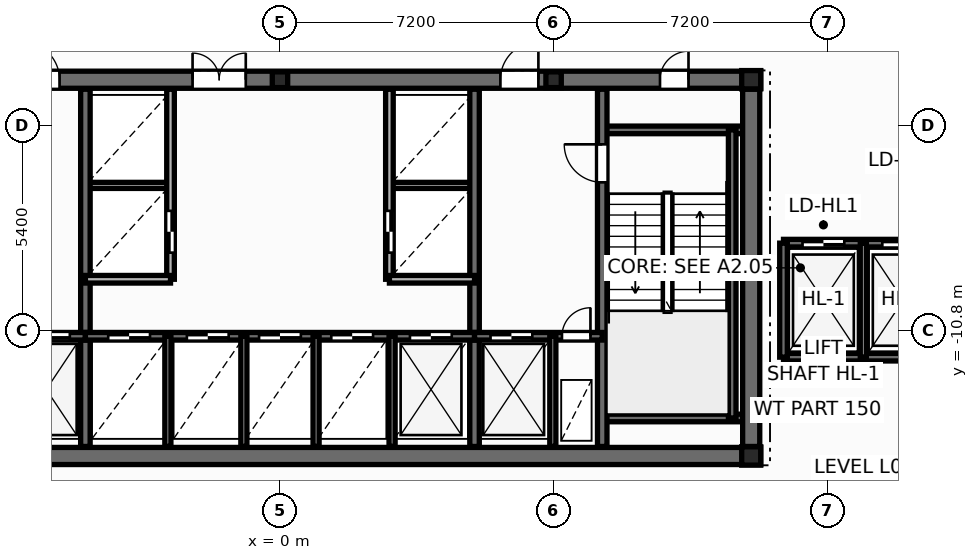
"""IFC4 building model, lengths in metres.
Left out: names, types, materials, properties, quantities, classifications, styles, units other than length and angle.
Written with IfcOpenShell. Run it as: python <this file> out.ifc"""

import sys

from ifc_helpers import new_model, si_unit, direction, frame, frame_2d, origin, origin_2d, place, context, subcontext, project, spatial, rectangle, i_section, extrude, element, fill, save


model = new_model("IFC4")
c1 = context("Model", 3, precision=1e-05, world=origin(), true_north=direction((0.0, 1.0)))
c2 = subcontext(c1, "Body", "Model", "MODEL_VIEW")
j1 = project(units=[si_unit("LENGTHUNIT", "METRE"), si_unit("PLANEANGLEUNIT", "RADIAN")], contexts=[c1])
p1 = place(None, origin())
s1 = spatial("IfcSite", under=j1, at=p1, CompositionType="ELEMENT")
p2 = place(p1, origin())
s2 = spatial("IfcBuilding", under=s1, at=p2, CompositionType="ELEMENT")
p3 = place(p2, frame((0.0, 0.0, 14.4)))
s3 = spatial("IfcBuildingStorey", under=s2, at=p3, CompositionType="ELEMENT", Elevation=14.4)
for number, where, z_axis, x_axis in (
    (1, (12.4, -14.1, 0.0), (0.0, 0.0, 1.0), (1.0, 0.0, 0.0)),
    (2, (12.4, -4.2, 0.0), (0.0, 0.0, 1.0), (1.0, 0.0, 0.0)),
):
    element("IfcColumn", number, at=place(p3, frame(where, z_axis=z_axis, x_axis=x_axis)), inside=s3, PredefinedType="COLUMN", context=c2, shape_type="SweptSolid", body=[
        extrude(i_section(OverallWidth=0.5, OverallDepth=0.482, WebThickness=0.04, FlangeThickness=0.045, at=origin_2d()), origin(), (0.0, 0.0, 1.0), 4.5),
    ])
for number, where, z_axis, x_axis in (
    (3, (0.0, -4.2, 0.0), (0.0, 0.0, 1.0), (1.0, 0.0, 0.0)),
    (4, (7.2, -4.2, 0.0), (0.0, 0.0, 1.0), (1.0, 0.0, 0.0)),
):
    element("IfcColumn", number, at=place(p3, frame(where, z_axis=z_axis, x_axis=x_axis)), inside=s3, PredefinedType="PILASTER", context=c2, shape_type="SweptSolid", body=[
        extrude(i_section(OverallWidth=0.405, OverallDepth=0.414, WebThickness=0.022, FlangeThickness=0.032, at=origin_2d()), origin(), (0.0, 0.0, 1.0), 4.5),
    ])
for number, where, z_axis, x_axis in (
    (5, (-5.12, -6.98, 0.0), (0.0, 0.0, 1.0), (1.0, 0.0, 0.0)),
    (6, (2.88, -6.98, 0.0), (0.0, 0.0, 1.0), (1.0, 0.0, 0.0)),
):
    element("IfcWall", number, at=place(p3, frame(where, z_axis=z_axis, x_axis=x_axis)), inside=s3, PredefinedType="PARTITIONING", context=c2, shape_type="SweptSolid", body=[
        extrude(rectangle(XDim=2.24, YDim=0.16, at=frame_2d((1.12, 0.0))), origin(), (0.0, 0.0, 1.0), 4.1),
    ])
p4 = place(p3, frame((-12.65, -14.1, 0.0), z_axis=(0.0, 0.0, 1.0), x_axis=(1.0, 0.0, 0.0)))
e7 = element("IfcWall", 7, at=p4, inside=s3, PredefinedType="SHEAR", context=c2, shape_type="SweptSolid", body=[
    extrude(rectangle(XDim=25.3, YDim=0.45, at=frame_2d((12.65, 0.0))), origin(), (0.0, 0.0, 1.0), 4.5),
])
p5 = place(p3, frame((-12.65, -4.2, 0.0), z_axis=(0.0, 0.0, 1.0), x_axis=(1.0, 0.0, 0.0)))
e8 = element("IfcWall", 8, at=p5, inside=s3, PredefinedType="SHEAR", context=c2, shape_type="SweptSolid", body=[
    extrude(rectangle(XDim=25.3, YDim=0.45, at=frame_2d((12.65, 0.0))), origin(), (0.0, 0.0, 1.0), 4.5),
])
p6 = place(p5, frame((1.85, 0.0, 0.0)))
e9 = element("IfcOpeningElement", 9, at=p6, cuts=e8, PredefinedType="OPENING", context=c2, shape_type="SweptSolid", body=[
    extrude(rectangle(XDim=0.756, YDim=2.054, at=frame_2d((0.375, 1.027))), frame((0.0, 0.235, 0.0), z_axis=(0.0, -1.0, 0.0), x_axis=(1.0, 0.0, 0.0)), (0.0, 0.0, 1.0), 0.47),
])
p7 = place(p5, frame((22.65, 0.0, 0.0)))
e10 = element("IfcOpeningElement", 10, at=p7, cuts=e8, PredefinedType="OPENING", context=c2, shape_type="SweptSolid", body=[
    extrude(rectangle(XDim=0.756, YDim=2.054, at=frame_2d((0.375, 1.027))), frame((0.0, 0.235, 0.0), z_axis=(0.0, -1.0, 0.0), x_axis=(1.0, 0.0, 0.0)), (0.0, 0.0, 1.0), 0.47),
])
p8 = place(p5, frame((5.85, 0.0, 0.0)))
e11 = element("IfcOpeningElement", 11, at=p8, cuts=e8, PredefinedType="OPENING", context=c2, shape_type="SweptSolid", body=[
    extrude(rectangle(XDim=1.006, YDim=2.104, at=frame_2d((0.5, 1.052))), frame((0.0, 0.235, 0.0), z_axis=(0.0, -1.0, 0.0), x_axis=(1.0, 0.0, 0.0)), (0.0, 0.0, 1.0), 0.47),
])
p9 = place(p5, frame((10.35, 0.0, 0.0)))
e12 = element("IfcOpeningElement", 12, at=p9, cuts=e8, PredefinedType="OPENING", context=c2, shape_type="SweptSolid", body=[
    extrude(rectangle(XDim=1.406, YDim=2.154, at=frame_2d((0.7, 1.077))), frame((0.0, 0.235, 0.0), z_axis=(0.0, -1.0, 0.0), x_axis=(1.0, 0.0, 0.0)), (0.0, 0.0, 1.0), 0.47),
])
p10 = place(p5, frame((18.45, 0.0, 0.0)))
e13 = element("IfcOpeningElement", 13, at=p10, cuts=e8, PredefinedType="OPENING", context=c2, shape_type="SweptSolid", body=[
    extrude(rectangle(XDim=1.006, YDim=2.104, at=frame_2d((0.5, 1.052))), frame((0.0, 0.235, 0.0), z_axis=(0.0, -1.0, 0.0), x_axis=(1.0, 0.0, 0.0)), (0.0, 0.0, 1.0), 0.47),
])
for number, where, z_axis, x_axis in (
    (14, (8.48, -5.52, 0.0), (0.0, 0.0, 1.0), (1.0, 0.0, 0.0)),
    (15, (8.48, -13.1, 0.0), (0.0, 0.0, 1.0), (1.0, 0.0, 0.0)),
):
    element("IfcWall", number, at=place(p3, frame(where, z_axis=z_axis, x_axis=x_axis)), inside=s3, PredefinedType="SOLIDWALL", context=c2, shape_type="SweptSolid", body=[
        extrude(rectangle(XDim=3.87, YDim=0.2, at=frame_2d((1.935, 0.0))), origin(), (0.0, 0.0, 1.0), 4.5),
    ])
p11 = place(p3, frame((11.9, -13.1, 0.0), z_axis=(0.0, 0.0, 1.0), x_axis=(0.0, 1.0, 0.0)))
e16 = element("IfcWall", 16, at=p11, inside=s3, PredefinedType="SOLIDWALL", context=c2, shape_type="SweptSolid", body=[
    extrude(rectangle(XDim=7.58, YDim=0.2, at=frame_2d((3.79, 0.0))), origin(), (0.0, 0.0, 1.0), 4.5),
])
p12 = place(p3, frame((8.48, -13.85, 0.0), z_axis=(0.0, 0.0, 1.0), x_axis=(0.0, 1.0, 0.0)))
e17 = element("IfcWall", 17, at=p12, inside=s3, PredefinedType="SHEAR", context=c2, shape_type="SweptSolid", body=[
    extrude(rectangle(XDim=9.4, YDim=0.25, at=frame_2d((4.7, 0.0))), origin(), (0.0, 0.0, 1.0), 4.5),
])
p13 = place(p12, frame((6.95, 0.0, 0.0)))
e18 = element("IfcOpeningElement", 18, at=p13, cuts=e17, PredefinedType="OPENING", context=c2, shape_type="SweptSolid", body=[
    extrude(rectangle(XDim=1.006, YDim=2.104, at=frame_2d((0.5, 1.052))), frame((0.0, 0.135, 0.0), z_axis=(0.0, -1.0, 0.0), x_axis=(1.0, 0.0, 0.0)), (0.0, 0.0, 1.0), 0.27),
])
for number, where, z_axis, x_axis in (
    (19, (-5.12, -13.85, 0.0), (0.0, 0.0, 1.0), (0.0, 1.0, 0.0)),
    (20, (5.12, -13.85, 0.0), (0.0, 0.0, 1.0), (0.0, 1.0, 0.0)),
):
    element("IfcWall", number, at=place(p3, frame(where, z_axis=z_axis, x_axis=x_axis)), inside=s3, PredefinedType="SHEAR", context=c2, shape_type="SweptSolid", body=[
        extrude(rectangle(XDim=9.4, YDim=0.25, at=frame_2d((4.7, 0.0))), origin(), (0.0, 0.0, 1.0), 4.5),
    ])
p14 = place(p3, frame((-8.48, -10.95, 0.0), z_axis=(0.0, 0.0, 1.0), x_axis=(1.0, 0.0, 0.0)))
e21 = element("IfcWall", 21, at=p14, inside=s3, PredefinedType="SOLIDWALL", context=c2, shape_type="SweptSolid", body=[
    extrude(rectangle(XDim=3.36, YDim=0.2, at=frame_2d((1.68, 0.0))), origin(), (0.0, 0.0, 1.0), 4.5),
])
p15 = place(p14, frame((0.28, 0.0, 0.0)))
e22 = element("IfcOpeningElement", 22, at=p15, cuts=e21, PredefinedType="OPENING", context=c2, shape_type="SweptSolid", body=[
    extrude(rectangle(XDim=0.756, YDim=2.054, at=frame_2d((0.375, 1.027))), frame((0.0, 0.11, 0.0), z_axis=(0.0, -1.0, 0.0), x_axis=(1.0, 0.0, 0.0)), (0.0, 0.0, 1.0), 0.22),
])
p16 = place(p14, frame((1.85, 0.0, 0.0)))
e23 = element("IfcOpeningElement", 23, at=p16, cuts=e21, PredefinedType="OPENING", context=c2, shape_type="SweptSolid", body=[
    extrude(rectangle(XDim=1.106, YDim=2.104, at=frame_2d((0.55, 1.052))), frame((0.0, 0.11, 0.0), z_axis=(0.0, -1.0, 0.0), x_axis=(1.0, 0.0, 0.0)), (0.0, 0.0, 1.0), 0.22),
])
p17 = place(p3, frame((-5.12, -10.95, 0.0), z_axis=(0.0, 0.0, 1.0), x_axis=(1.0, 0.0, 0.0)))
e24 = element("IfcWall", 24, at=p17, inside=s3, PredefinedType="SOLIDWALL", context=c2, shape_type="SweptSolid", body=[
    extrude(rectangle(XDim=10.24, YDim=0.2, at=frame_2d((5.12, 0.0))), origin(), (0.0, 0.0, 1.0), 4.5),
])
p18 = place(p17, frame((0.6, 0.0, 0.0)))
e25 = element("IfcOpeningElement", 25, at=p18, cuts=e24, PredefinedType="OPENING", context=c2, shape_type="SweptSolid", body=[
    extrude(rectangle(XDim=1.106, YDim=2.104, at=frame_2d((0.55, 1.052))), frame((0.0, 0.11, 0.0), z_axis=(0.0, -1.0, 0.0), x_axis=(1.0, 0.0, 0.0)), (0.0, 0.0, 1.0), 0.22),
])
p19 = place(p17, frame((2.67, 0.0, 0.0)))
e26 = element("IfcOpeningElement", 26, at=p19, cuts=e24, PredefinedType="OPENING", context=c2, shape_type="SweptSolid", body=[
    extrude(rectangle(XDim=1.106, YDim=2.104, at=frame_2d((0.55, 1.052))), frame((0.0, 0.11, 0.0), z_axis=(0.0, -1.0, 0.0), x_axis=(1.0, 0.0, 0.0)), (0.0, 0.0, 1.0), 0.22),
])
p20 = place(p17, frame((4.57, 0.0, 0.0)))
e27 = element("IfcOpeningElement", 27, at=p20, cuts=e24, PredefinedType="OPENING", context=c2, shape_type="SweptSolid", body=[
    extrude(rectangle(XDim=1.106, YDim=2.104, at=frame_2d((0.55, 1.052))), frame((0.0, 0.11, 0.0), z_axis=(0.0, -1.0, 0.0), x_axis=(1.0, 0.0, 0.0)), (0.0, 0.0, 1.0), 0.22),
])
p21 = place(p17, frame((6.47, 0.0, 0.0)))
e28 = element("IfcOpeningElement", 28, at=p21, cuts=e24, PredefinedType="OPENING", context=c2, shape_type="SweptSolid", body=[
    extrude(rectangle(XDim=1.106, YDim=2.104, at=frame_2d((0.55, 1.052))), frame((0.0, 0.11, 0.0), z_axis=(0.0, -1.0, 0.0), x_axis=(1.0, 0.0, 0.0)), (0.0, 0.0, 1.0), 0.22),
])
p22 = place(p17, frame((8.54, 0.0, 0.0)))
e29 = element("IfcOpeningElement", 29, at=p22, cuts=e24, PredefinedType="OPENING", context=c2, shape_type="SweptSolid", body=[
    extrude(rectangle(XDim=1.106, YDim=2.104, at=frame_2d((0.55, 1.052))), frame((0.0, 0.11, 0.0), z_axis=(0.0, -1.0, 0.0), x_axis=(1.0, 0.0, 0.0)), (0.0, 0.0, 1.0), 0.22),
])
p23 = place(p3, frame((5.12, -10.95, 0.0), z_axis=(0.0, 0.0, 1.0), x_axis=(1.0, 0.0, 0.0)))
e30 = element("IfcWall", 30, at=p23, inside=s3, PredefinedType="SOLIDWALL", context=c2, shape_type="SweptSolid", body=[
    extrude(rectangle(XDim=3.36, YDim=0.2, at=frame_2d((1.68, 0.0))), origin(), (0.0, 0.0, 1.0), 4.5),
])
p24 = place(p23, frame((0.42, 0.0, 0.0)))
e31 = element("IfcOpeningElement", 31, at=p24, cuts=e30, PredefinedType="OPENING", context=c2, shape_type="SweptSolid", body=[
    extrude(rectangle(XDim=1.106, YDim=2.104, at=frame_2d((0.55, 1.052))), frame((0.0, 0.11, 0.0), z_axis=(0.0, -1.0, 0.0), x_axis=(1.0, 0.0, 0.0)), (0.0, 0.0, 1.0), 0.22),
])
p25 = place(p23, frame((2.3, 0.0, 0.0)))
e32 = element("IfcOpeningElement", 32, at=p25, cuts=e30, PredefinedType="OPENING", context=c2, shape_type="SweptSolid", body=[
    extrude(rectangle(XDim=0.756, YDim=2.054, at=frame_2d((0.375, 1.027))), frame((0.0, 0.11, 0.0), z_axis=(0.0, -1.0, 0.0), x_axis=(1.0, 0.0, 0.0)), (0.0, 0.0, 1.0), 0.22),
])
for number, where, z_axis, x_axis in (
    (33, (7.18, -13.85, 0.0), (0.0, 0.0, 1.0), (0.0, 1.0, 0.0)),
    (34, (-2.95, -13.85, 0.0), (0.0, 0.0, 1.0), (0.0, 1.0, 0.0)),
    (35, (2.95, -13.85, 0.0), (0.0, 0.0, 1.0), (0.0, 1.0, 0.0)),
):
    element("IfcWall", number, at=place(p3, frame(where, z_axis=z_axis, x_axis=x_axis)), inside=s3, PredefinedType="PARTITIONING", context=c2, shape_type="SweptSolid", body=[
        extrude(rectangle(XDim=2.9, YDim=0.16, at=frame_2d((1.45, 0.0))), origin(), (0.0, 0.0, 1.0), 3.125),
    ])
p26 = place(p3, frame((12.4, -13.85, 0.0), z_axis=(0.0, 0.0, 1.0), x_axis=(0.0, 1.0, 0.0)))
e36 = element("IfcWall", 36, at=p26, inside=s3, PredefinedType="SHEAR", context=c2, shape_type="SweptSolid", body=[
    extrude(rectangle(XDim=9.4, YDim=0.45, at=frame_2d((4.7, 0.0))), origin(), (0.0, 0.0, 1.0), 4.5),
])
p27 = place(p3, frame((-2.88, -9.45, 0.0), z_axis=(0.0, 0.0, 1.0), x_axis=(0.0, 1.0, 0.0)))
e37 = element("IfcWall", 37, at=p27, inside=s3, PredefinedType="SOLIDWALL", context=c2, shape_type="SweptSolid", body=[
    extrude(rectangle(XDim=5.0, YDim=0.2, at=frame_2d((2.5, 0.0))), origin(), (0.0, 0.0, 1.0), 4.1),
])
p28 = place(p27, frame((0.7, 0.0, 0.0)))
e38 = element("IfcOpeningElement", 38, at=p28, cuts=e37, PredefinedType="OPENING", context=c2, shape_type="SweptSolid", body=[
    extrude(rectangle(XDim=1.106, YDim=2.104, at=frame_2d((0.55, 1.052))), frame((0.0, 0.11, 0.0), z_axis=(0.0, -1.0, 0.0), x_axis=(1.0, 0.0, 0.0)), (0.0, 0.0, 1.0), 0.22),
])
p29 = place(p3, frame((-5.12, -9.45, 0.0), z_axis=(0.0, 0.0, 1.0), x_axis=(1.0, 0.0, 0.0)))
e39 = element("IfcWall", 39, at=p29, inside=s3, PredefinedType="SOLIDWALL", context=c2, shape_type="SweptSolid", body=[
    extrude(rectangle(XDim=2.24, YDim=0.2, at=frame_2d((1.12, 0.0))), origin(), (0.0, 0.0, 1.0), 4.1),
])
p30 = place(p3, frame((2.88, -9.45, 0.0), z_axis=(0.0, 0.0, 1.0), x_axis=(0.0, 1.0, 0.0)))
e40 = element("IfcWall", 40, at=p30, inside=s3, PredefinedType="SOLIDWALL", context=c2, shape_type="SweptSolid", body=[
    extrude(rectangle(XDim=5.0, YDim=0.2, at=frame_2d((2.5, 0.0))), origin(), (0.0, 0.0, 1.0), 4.1),
])
p31 = place(p30, frame((0.7, 0.0, 0.0)))
e41 = element("IfcOpeningElement", 41, at=p31, cuts=e40, PredefinedType="OPENING", context=c2, shape_type="SweptSolid", body=[
    extrude(rectangle(XDim=1.106, YDim=2.104, at=frame_2d((0.55, 1.052))), frame((0.0, 0.11, 0.0), z_axis=(0.0, -1.0, 0.0), x_axis=(1.0, 0.0, 0.0)), (0.0, 0.0, 1.0), 0.22),
])
p32 = place(p3, frame((2.88, -9.45, 0.0), z_axis=(0.0, 0.0, 1.0), x_axis=(1.0, 0.0, 0.0)))
e42 = element("IfcWall", 42, at=p32, inside=s3, PredefinedType="SOLIDWALL", context=c2, shape_type="SweptSolid", body=[
    extrude(rectangle(XDim=2.24, YDim=0.2, at=frame_2d((1.12, 0.0))), origin(), (0.0, 0.0, 1.0), 4.1),
])
for number, where, z_axis, x_axis in (
    (43, (-0.95, -13.85, 0.0), (0.0, 0.0, 1.0), (0.0, 1.0, 0.0)),
    (44, (0.95, -13.85, 0.0), (0.0, 0.0, 1.0), (0.0, 1.0, 0.0)),
):
    element("IfcWall", number, at=place(p3, frame(where, z_axis=z_axis, x_axis=x_axis)), inside=s3, PredefinedType="PARTITIONING", context=c2, shape_type="SweptSolid", body=[
        extrude(rectangle(XDim=2.9, YDim=0.16, at=frame_2d((1.45, 0.0))), origin(), (0.0, 0.0, 1.0), 3.125),
    ])
p33 = place(p3, frame((13.25, -11.5, 0.0), z_axis=(0.0, 0.0, 1.0), x_axis=(1.0, 0.0, 0.0)))
e45 = element("IfcWall", 45, at=p33, inside=s3, PredefinedType="SOLIDWALL", context=c2, shape_type="SweptSolid", body=[
    extrude(rectangle(XDim=4.2, YDim=0.2, at=frame_2d((2.1, 0.0))), origin(), (0.0, 0.0, 1.0), 4.5),
])
p34 = place(p3, frame((13.25, -8.5, 0.0), z_axis=(0.0, 0.0, 1.0), x_axis=(1.0, 0.0, 0.0)))
e46 = element("IfcWall", 46, at=p34, inside=s3, PredefinedType="SOLIDWALL", context=c2, shape_type="SweptSolid", body=[
    extrude(rectangle(XDim=4.2, YDim=0.2, at=frame_2d((2.1, 0.0))), origin(), (0.0, 0.0, 1.0), 4.5),
])
p35 = place(p34, frame((0.5, 0.0, 0.0)))
e47 = element("IfcOpeningElement", 47, at=p35, cuts=e46, PredefinedType="OPENING", context=c2, shape_type="SweptSolid", body=[
    extrude(rectangle(XDim=1.106, YDim=2.104, at=frame_2d((0.55, 1.052))), frame((0.0, 0.11, 0.0), z_axis=(0.0, -1.0, 0.0), x_axis=(1.0, 0.0, 0.0)), (0.0, 0.0, 1.0), 0.22),
])
p36 = place(p34, frame((2.6, 0.0, 0.0)))
e48 = element("IfcOpeningElement", 48, at=p36, cuts=e46, PredefinedType="OPENING", context=c2, shape_type="SweptSolid", body=[
    extrude(rectangle(XDim=1.106, YDim=2.104, at=frame_2d((0.55, 1.052))), frame((0.0, 0.11, 0.0), z_axis=(0.0, -1.0, 0.0), x_axis=(1.0, 0.0, 0.0)), (0.0, 0.0, 1.0), 0.22),
])
p37 = place(p3, frame((13.25, -11.5, 0.0), z_axis=(0.0, 0.0, 1.0), x_axis=(0.0, 1.0, 0.0)))
e49 = element("IfcWall", 49, at=p37, inside=s3, PredefinedType="SOLIDWALL", context=c2, shape_type="SweptSolid", body=[
    extrude(rectangle(XDim=3.0, YDim=0.2, at=frame_2d((1.5, 0.0))), origin(), (0.0, 0.0, 1.0), 4.5),
])
p38 = place(p3, frame((15.35, -11.5, 0.0), z_axis=(0.0, 0.0, 1.0), x_axis=(0.0, 1.0, 0.0)))
e50 = element("IfcWall", 50, at=p38, inside=s3, PredefinedType="PARTITIONING", context=c2, shape_type="SweptSolid", body=[
    extrude(rectangle(XDim=3.0, YDim=0.16, at=frame_2d((1.5, 0.0))), origin(), (0.0, 0.0, 1.0), 4.1),
])
p39 = place(p28, origin())
e51 = element("IfcDoor", 51, at=p39, inside=s3, OperationType="DOUBLE_DOOR_SLIDING", PredefinedType="DOOR", context=c2, shape_type="SweptSolid", body=[
    extrude(rectangle(XDim=1.1, YDim=2.1, at=frame_2d((0.55, 1.05))), frame((0.0, 0.025, 0.0), z_axis=(0.0, -1.0, 0.0), x_axis=(1.0, 0.0, 0.0)), (0.0, 0.0, 1.0), 0.05),
])
fill(e38, e51)
p40 = place(p31, origin())
e52 = element("IfcDoor", 52, at=p40, inside=s3, OperationType="DOUBLE_DOOR_SLIDING", PredefinedType="DOOR", context=c2, shape_type="SweptSolid", body=[
    extrude(rectangle(XDim=1.1, YDim=2.1, at=frame_2d((0.55, 1.05))), frame((0.0, 0.025, 0.0), z_axis=(0.0, -1.0, 0.0), x_axis=(1.0, 0.0, 0.0)), (0.0, 0.0, 1.0), 0.05),
])
fill(e41, e52)
p41 = place(p13, origin())
e53 = element("IfcDoor", 53, at=p41, inside=s3, OperationType="SINGLE_SWING_RIGHT", PredefinedType="DOOR", context=c2, shape_type="SweptSolid", body=[
    extrude(rectangle(XDim=1.0, YDim=2.1, at=frame_2d((0.5, 1.05))), frame((0.0, 0.025, 0.0), z_axis=(0.0, -1.0, 0.0), x_axis=(1.0, 0.0, 0.0)), (0.0, 0.0, 1.0), 0.05),
])
fill(e18, e53)
p42 = place(p16, origin())
e54 = element("IfcDoor", 54, at=p42, inside=s3, OperationType="DOUBLE_DOOR_SLIDING", PredefinedType="DOOR", context=c2, shape_type="SweptSolid", body=[
    extrude(rectangle(XDim=1.1, YDim=2.1, at=frame_2d((0.55, 1.05))), frame((0.0, 0.025, 0.0), z_axis=(0.0, -1.0, 0.0), x_axis=(1.0, 0.0, 0.0)), (0.0, 0.0, 1.0), 0.05),
])
fill(e23, e54)
p43 = place(p24, origin())
e55 = element("IfcDoor", 55, at=p43, inside=s3, OperationType="DOUBLE_DOOR_SLIDING", PredefinedType="DOOR", context=c2, shape_type="SweptSolid", body=[
    extrude(rectangle(XDim=1.1, YDim=2.1, at=frame_2d((0.55, 1.05))), frame((0.0, 0.025, 0.0), z_axis=(0.0, -1.0, 0.0), x_axis=(1.0, 0.0, 0.0)), (0.0, 0.0, 1.0), 0.05),
])
fill(e31, e55)
p44 = place(p25, origin())
e56 = element("IfcDoor", 56, at=p44, inside=s3, OperationType="SINGLE_SWING_RIGHT", PredefinedType="DOOR", context=c2, shape_type="SweptSolid", body=[
    extrude(rectangle(XDim=0.75, YDim=2.05, at=frame_2d((0.375, 1.025))), frame((0.0, 0.025, 0.0), z_axis=(0.0, -1.0, 0.0), x_axis=(1.0, 0.0, 0.0)), (0.0, 0.0, 1.0), 0.05),
])
fill(e32, e56)
p45 = place(p18, origin())
e57 = element("IfcDoor", 57, at=p45, inside=s3, OperationType="DOUBLE_DOOR_SLIDING", PredefinedType="DOOR", context=c2, shape_type="SweptSolid", body=[
    extrude(rectangle(XDim=1.1, YDim=2.1, at=frame_2d((0.55, 1.05))), frame((0.0, 0.025, 0.0), z_axis=(0.0, -1.0, 0.0), x_axis=(1.0, 0.0, 0.0)), (0.0, 0.0, 1.0), 0.05),
])
fill(e25, e57)
p46 = place(p19, origin())
e58 = element("IfcDoor", 58, at=p46, inside=s3, OperationType="DOUBLE_DOOR_SLIDING", PredefinedType="DOOR", context=c2, shape_type="SweptSolid", body=[
    extrude(rectangle(XDim=1.1, YDim=2.1, at=frame_2d((0.55, 1.05))), frame((0.0, 0.025, 0.0), z_axis=(0.0, -1.0, 0.0), x_axis=(1.0, 0.0, 0.0)), (0.0, 0.0, 1.0), 0.05),
])
fill(e26, e58)
p47 = place(p20, origin())
e59 = element("IfcDoor", 59, at=p47, inside=s3, OperationType="DOUBLE_DOOR_SLIDING", PredefinedType="DOOR", context=c2, shape_type="SweptSolid", body=[
    extrude(rectangle(XDim=1.1, YDim=2.1, at=frame_2d((0.55, 1.05))), frame((0.0, 0.025, 0.0), z_axis=(0.0, -1.0, 0.0), x_axis=(1.0, 0.0, 0.0)), (0.0, 0.0, 1.0), 0.05),
])
fill(e27, e59)
p48 = place(p21, origin())
e60 = element("IfcDoor", 60, at=p48, inside=s3, OperationType="DOUBLE_DOOR_SLIDING", PredefinedType="DOOR", context=c2, shape_type="SweptSolid", body=[
    extrude(rectangle(XDim=1.1, YDim=2.1, at=frame_2d((0.55, 1.05))), frame((0.0, 0.025, 0.0), z_axis=(0.0, -1.0, 0.0), x_axis=(1.0, 0.0, 0.0)), (0.0, 0.0, 1.0), 0.05),
])
fill(e28, e60)
p49 = place(p22, origin())
e61 = element("IfcDoor", 61, at=p49, inside=s3, OperationType="DOUBLE_DOOR_SLIDING", PredefinedType="DOOR", context=c2, shape_type="SweptSolid", body=[
    extrude(rectangle(XDim=1.1, YDim=2.1, at=frame_2d((0.55, 1.05))), frame((0.0, 0.025, 0.0), z_axis=(0.0, -1.0, 0.0), x_axis=(1.0, 0.0, 0.0)), (0.0, 0.0, 1.0), 0.05),
])
fill(e29, e61)
p50 = place(p7, origin())
e62 = element("IfcDoor", 62, at=p50, inside=s3, OperationType="SINGLE_SWING_RIGHT", PredefinedType="DOOR", context=c2, shape_type="SweptSolid", body=[
    extrude(rectangle(XDim=0.75, YDim=2.05, at=frame_2d((0.375, 1.025))), frame((0.0, 0.025, 0.0), z_axis=(0.0, -1.0, 0.0), x_axis=(1.0, 0.0, 0.0)), (0.0, 0.0, 1.0), 0.05),
])
fill(e10, e62)
p51 = place(p8, origin())
e63 = element("IfcDoor", 63, at=p51, inside=s3, OperationType="SINGLE_SWING_LEFT", PredefinedType="DOOR", context=c2, shape_type="SweptSolid", body=[
    extrude(rectangle(XDim=1.0, YDim=2.1, at=frame_2d((0.5, 1.05))), frame((0.0, 0.025, 0.0), z_axis=(0.0, -1.0, 0.0), x_axis=(1.0, 0.0, 0.0)), (0.0, 0.0, 1.0), 0.05),
])
fill(e11, e63)
p52 = place(p9, origin())
e64 = element("IfcDoor", 64, at=p52, inside=s3, OperationType="DOUBLE_DOOR_SINGLE_SWING", PredefinedType="DOOR", context=c2, shape_type="SweptSolid", body=[
    extrude(rectangle(XDim=1.4, YDim=2.15, at=frame_2d((0.7, 1.075))), frame((0.0, 0.025, 0.0), z_axis=(0.0, -1.0, 0.0), x_axis=(1.0, 0.0, 0.0)), (0.0, 0.0, 1.0), 0.05),
])
fill(e12, e64)
p53 = place(p10, origin())
e65 = element("IfcDoor", 65, at=p53, inside=s3, OperationType="SINGLE_SWING_RIGHT", PredefinedType="DOOR", context=c2, shape_type="SweptSolid", body=[
    extrude(rectangle(XDim=1.0, YDim=2.1, at=frame_2d((0.5, 1.05))), frame((0.0, 0.025, 0.0), z_axis=(0.0, -1.0, 0.0), x_axis=(1.0, 0.0, 0.0)), (0.0, 0.0, 1.0), 0.05),
])
fill(e13, e65)
p54 = place(p35, origin())
e66 = element("IfcDoor", 66, at=p54, inside=s3, OperationType="DOUBLE_DOOR_SLIDING", PredefinedType="DOOR", context=c2, shape_type="SweptSolid", body=[
    extrude(rectangle(XDim=1.1, YDim=2.1, at=frame_2d((0.55, 1.05))), frame((0.0, 0.025, 0.0), z_axis=(0.0, -1.0, 0.0), x_axis=(1.0, 0.0, 0.0)), (0.0, 0.0, 1.0), 0.05),
])
fill(e47, e66)
p55 = place(p36, origin())
e67 = element("IfcDoor", 67, at=p55, inside=s3, OperationType="DOUBLE_DOOR_SLIDING", PredefinedType="DOOR", context=c2, shape_type="SweptSolid", body=[
    extrude(rectangle(XDim=1.1, YDim=2.1, at=frame_2d((0.55, 1.05))), frame((0.0, 0.025, 0.0), z_axis=(0.0, -1.0, 0.0), x_axis=(1.0, 0.0, 0.0)), (0.0, 0.0, 1.0), 0.05),
])
fill(e48, e67)
save(model, sys.argv[1])
